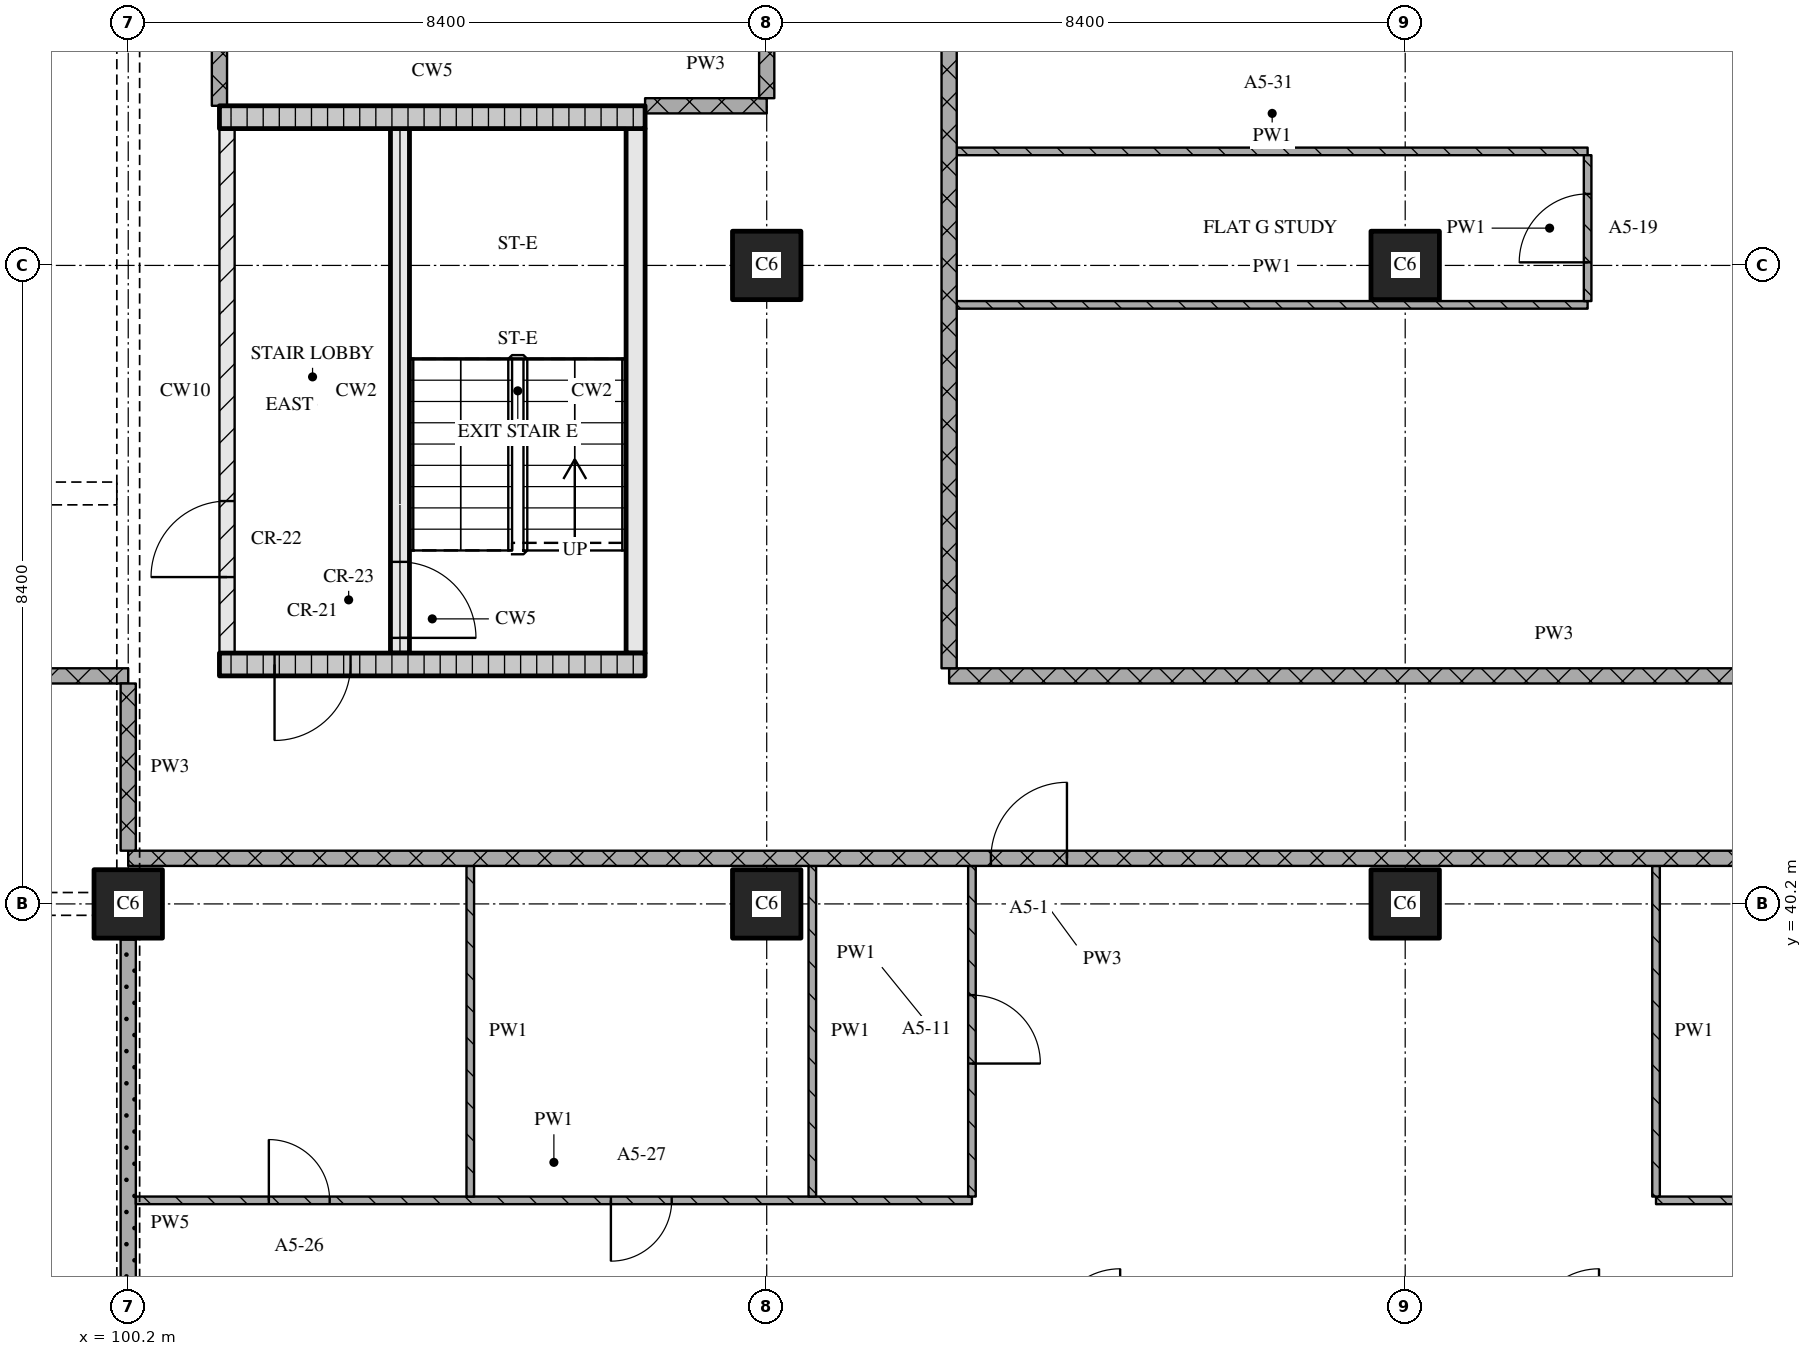
"""IFC4 building model, lengths in metres.
Left out: names, types, materials, properties, quantities, classifications, styles, units other than length and angle.
Written with IfcOpenShell. Run it as: python <this file> out.ifc"""

import sys

from ifc_helpers import new_model, si_unit, direction, frame, frame_2d, origin, origin_2d, place, context, subcontext, project, spatial, rectangle, extrude, element, fill, save


model = new_model("IFC4")
c1 = context("Model", 3, precision=1e-05, world=origin(), true_north=direction((0.0, 1.0)))
c2 = subcontext(c1, "Body", "Model", "MODEL_VIEW")
j1 = project(units=[si_unit("LENGTHUNIT", "METRE"), si_unit("PLANEANGLEUNIT", "RADIAN")], contexts=[c1])
p1 = place(None, origin())
s1 = spatial("IfcSite", under=j1, at=p1, CompositionType="ELEMENT")
p2 = place(p1, origin())
s2 = spatial("IfcBuilding", under=s1, at=p2, CompositionType="ELEMENT")
p3 = place(p2, frame((0.0, 0.0, 80.4)))
s3 = spatial("IfcBuildingStorey", under=s2, at=p3, CompositionType="ELEMENT", Elevation=80.4)
for number, where, z_axis, x_axis in (
    (1, (100.2, 40.2, 0.0), (0.0, 0.0, 1.0), (1.0, 0.0, 0.0)),
    (2, (108.6, 40.2, 0.0), (0.0, 0.0, 1.0), (1.0, 0.0, 0.0)),
    (3, (108.6, 48.6, 0.0), (0.0, 0.0, 1.0), (1.0, 0.0, 0.0)),
    (4, (117.0, 40.2, 0.0), (0.0, 0.0, 1.0), (1.0, 0.0, 0.0)),
    (5, (117.0, 48.6, 0.0), (0.0, 0.0, 1.0), (1.0, 0.0, 0.0)),
):
    element("IfcColumn", number, at=place(p3, frame(where, z_axis=z_axis, x_axis=x_axis)), inside=s3, PredefinedType="COLUMN", context=c2, shape_type="SweptSolid", body=[
        extrude(rectangle(XDim=0.9, YDim=0.9, at=origin_2d()), origin(), (0.0, 0.0, 1.0), 3.6),
    ])
p4 = place(p3, frame((101.4, 43.35, 0.0), z_axis=(0.0, 0.0, 1.0), x_axis=(1.0, 0.0, 0.0)))
e6 = element("IfcWall", 6, at=p4, inside=s3, PredefinedType="SOLIDWALL", context=c2, shape_type="SweptSolid", body=[
    extrude(rectangle(XDim=5.6, YDim=0.3, at=frame_2d((2.8, 0.0))), origin(), (0.0, 0.0, 1.0), 3.3),
])
p5 = place(p4, frame((0.725, 0.0, 0.0)))
e7 = element("IfcOpeningElement", 7, at=p5, cuts=e6, PredefinedType="OPENING", context=c2, shape_type="SweptSolid", body=[
    extrude(rectangle(XDim=1.0, YDim=2.1, at=frame_2d((0.5, 1.05))), frame((0.0, 0.16, 0.0), z_axis=(0.0, -1.0, 0.0), x_axis=(1.0, 0.0, 0.0)), (0.0, 0.0, 1.0), 0.32),
])
p6 = place(p3, frame((101.5, 43.5, 0.0), z_axis=(0.0, 0.0, 1.0), x_axis=(0.0, 1.0, 0.0)))
e8 = element("IfcWall", 8, at=p6, inside=s3, PredefinedType="PARTITIONING", context=c2, shape_type="SweptSolid", body=[
    extrude(rectangle(XDim=6.9, YDim=0.2, at=frame_2d((3.45, 0.0))), origin(), (0.0, 0.0, 1.0), 3.3),
])
p7 = place(p6, frame((1.0, 0.0, 0.0)))
e9 = element("IfcOpeningElement", 9, at=p7, cuts=e8, PredefinedType="OPENING", context=c2, shape_type="SweptSolid", body=[
    extrude(rectangle(XDim=1.0, YDim=2.1, at=frame_2d((0.5, 1.05))), frame((0.0, 0.11, 0.0), z_axis=(0.0, -1.0, 0.0), x_axis=(1.0, 0.0, 0.0)), (0.0, 0.0, 1.0), 0.22),
])
p8 = place(p3, frame((103.775, 43.5, 0.0), z_axis=(0.0, 0.0, 1.0), x_axis=(0.0, 1.0, 0.0)))
e10 = element("IfcWall", 10, at=p8, inside=s3, PredefinedType="SOLIDWALL", context=c2, shape_type="SweptSolid", body=[
    extrude(rectangle(XDim=6.9, YDim=0.25, at=frame_2d((3.45, 0.0))), origin(), (0.0, 0.0, 1.0), 3.3),
])
p9 = place(p8, frame((0.2, 0.0, 0.0)))
e11 = element("IfcOpeningElement", 11, at=p9, cuts=e10, PredefinedType="OPENING", context=c2, shape_type="SweptSolid", body=[
    extrude(rectangle(XDim=1.0, YDim=2.1, at=frame_2d((0.5, 1.05))), frame((0.0, 0.135, 0.0), z_axis=(0.0, -1.0, 0.0), x_axis=(1.0, 0.0, 0.0)), (0.0, 0.0, 1.0), 0.27),
])
p10 = place(p3, frame((106.875, 43.5, 0.0), z_axis=(0.0, 0.0, 1.0), x_axis=(0.0, 1.0, 0.0)))
e12 = element("IfcWall", 12, at=p10, inside=s3, PredefinedType="SOLIDWALL", context=c2, shape_type="SweptSolid", body=[
    extrude(rectangle(XDim=6.9, YDim=0.25, at=frame_2d((3.45, 0.0))), origin(), (0.0, 0.0, 1.0), 3.3),
])
p11 = place(p3, frame((101.4, 50.55, 0.0), z_axis=(0.0, 0.0, 1.0), x_axis=(1.0, 0.0, 0.0)))
e13 = element("IfcWall", 13, at=p11, inside=s3, PredefinedType="SOLIDWALL", context=c2, shape_type="SweptSolid", body=[
    extrude(rectangle(XDim=5.6, YDim=0.3, at=frame_2d((2.8, 0.0))), origin(), (0.0, 0.0, 1.0), 3.3),
])
p12 = place(p3, frame((100.3, 36.3, 0.0), z_axis=(0.0, 0.0, 1.0), x_axis=(1.0, 0.0, 0.0)))
e14 = element("IfcWall", 14, at=p12, inside=s3, PredefinedType="PARTITIONING", context=c2, shape_type="SweptSolid", body=[
    extrude(rectangle(XDim=11.0, YDim=0.1, at=frame_2d((5.5, 0.0))), origin(), (0.0, 0.0, 1.0), 3.3),
])
p13 = place(p12, frame((1.75, 0.0, 0.0)))
e15 = element("IfcOpeningElement", 15, at=p13, cuts=e14, PredefinedType="OPENING", context=c2, shape_type="SweptSolid", body=[
    extrude(rectangle(XDim=0.8, YDim=2.1, at=frame_2d((0.4, 1.05))), frame((0.0, 0.06, 0.0), z_axis=(0.0, -1.0, 0.0), x_axis=(1.0, 0.0, 0.0)), (0.0, 0.0, 1.0), 0.12),
])
p14 = place(p12, frame((6.25, 0.0, 0.0)))
e16 = element("IfcOpeningElement", 16, at=p14, cuts=e14, PredefinedType="OPENING", context=c2, shape_type="SweptSolid", body=[
    extrude(rectangle(XDim=0.8, YDim=2.1, at=frame_2d((0.4, 1.05))), frame((0.0, 0.06, 0.0), z_axis=(0.0, -1.0, 0.0), x_axis=(1.0, 0.0, 0.0)), (0.0, 0.0, 1.0), 0.12),
])
p15 = place(p3, frame((120.3, 36.3, 0.0), z_axis=(0.0, 0.0, 1.0), x_axis=(1.0, 0.0, 0.0)))
e17 = element("IfcWall", 17, at=p15, inside=s3, PredefinedType="PARTITIONING", context=c2, shape_type="SweptSolid", body=[
    extrude(rectangle(XDim=6.62, YDim=0.1, at=frame_2d((3.31, 0.0))), origin(), (0.0, 0.0, 1.0), 3.3),
])
p16 = place(p15, frame((3.0, 0.0, 0.0)))
e18 = element("IfcOpeningElement", 18, at=p16, cuts=e17, PredefinedType="OPENING", context=c2, shape_type="SweptSolid", body=[
    extrude(rectangle(XDim=0.9, YDim=2.1, at=frame_2d((0.45, 1.05))), frame((0.0, 0.06, 0.0), z_axis=(0.0, -1.0, 0.0), x_axis=(1.0, 0.0, 0.0)), (0.0, 0.0, 1.0), 0.12),
])
p17 = place(p3, frame((124.28, 40.8, 0.0), z_axis=(0.0, 0.0, 1.0), x_axis=(-1.0, 0.0, 0.0)))
e19 = element("IfcWall", 19, at=p17, inside=s3, PredefinedType="PARTITIONING", context=c2, shape_type="SweptSolid", body=[
    extrude(rectangle(XDim=24.08, YDim=0.2, at=frame_2d((12.04, 0.0))), origin(), (0.0, 0.0, 1.0), 3.3),
])
p18 = place(p17, frame((11.73, 0.0, 0.0)))
e20 = element("IfcOpeningElement", 20, at=p18, cuts=e19, PredefinedType="OPENING", context=c2, shape_type="SweptSolid", body=[
    extrude(rectangle(XDim=1.0, YDim=2.1, at=frame_2d((0.5, 1.05))), frame((0.0, 0.11, 0.0), z_axis=(0.0, -1.0, 0.0), x_axis=(1.0, 0.0, 0.0)), (0.0, 0.0, 1.0), 0.22),
])
p19 = place(p3, frame((100.2, 43.2, 0.0), z_axis=(0.0, 0.0, 1.0), x_axis=(-1.0, 0.0, 0.0)))
e21 = element("IfcWall", 21, at=p19, inside=s3, PredefinedType="PARTITIONING", context=c2, shape_type="SweptSolid", body=[
    extrude(rectangle(XDim=25.2, YDim=0.2, at=frame_2d((12.6, 0.0))), origin(), (0.0, 0.0, 1.0), 3.3),
])
p20 = place(p19, frame((7.8, 0.0, 0.0)))
e22 = element("IfcOpeningElement", 22, at=p20, cuts=e21, PredefinedType="OPENING", context=c2, shape_type="SweptSolid", body=[
    extrude(rectangle(XDim=1.2, YDim=2.1, at=frame_2d((0.6, 1.05))), frame((0.0, 0.11, 0.0), z_axis=(0.0, -1.0, 0.0), x_axis=(1.0, 0.0, 0.0)), (0.0, 0.0, 1.0), 0.22),
])
p21 = place(p19, frame((20.4, 0.0, 0.0)))
e23 = element("IfcOpeningElement", 23, at=p21, cuts=e21, PredefinedType="OPENING", context=c2, shape_type="SweptSolid", body=[
    extrude(rectangle(XDim=1.2, YDim=2.1, at=frame_2d((0.6, 1.05))), frame((0.0, 0.11, 0.0), z_axis=(0.0, -1.0, 0.0), x_axis=(1.0, 0.0, 0.0)), (0.0, 0.0, 1.0), 0.22),
])
p22 = place(p3, frame((111.0, 43.2, 0.0), z_axis=(0.0, 0.0, 1.0), x_axis=(1.0, 0.0, 0.0)))
e24 = element("IfcWall", 24, at=p22, inside=s3, PredefinedType="PARTITIONING", context=c2, shape_type="SweptSolid", body=[
    extrude(rectangle(XDim=15.92, YDim=0.2, at=frame_2d((7.96, 0.0))), origin(), (0.0, 0.0, 1.0), 3.3),
])
p23 = place(p22, frame((10.95, 0.0, 0.0)))
e25 = element("IfcOpeningElement", 25, at=p23, cuts=e24, PredefinedType="OPENING", context=c2, shape_type="SweptSolid", body=[
    extrude(rectangle(XDim=1.0, YDim=2.1, at=frame_2d((0.5, 1.05))), frame((0.0, 0.11, 0.0), z_axis=(0.0, -1.0, 0.0), x_axis=(1.0, 0.0, 0.0)), (0.0, 0.0, 1.0), 0.22),
])
for number, where, z_axis, x_axis in (
    (26, (111.1, 48.081, 0.0), (0.0, 0.0, 1.0), (1.0, 0.0, 0.0)),
    (27, (111.1, 50.1, 0.0), (0.0, 0.0, 1.0), (1.0, 0.0, 0.0)),
):
    element("IfcWall", number, at=place(p3, frame(where, z_axis=z_axis, x_axis=x_axis)), inside=s3, PredefinedType="PARTITIONING", context=c2, shape_type="SweptSolid", body=[
        extrude(rectangle(XDim=8.3, YDim=0.1, at=frame_2d((4.15, 0.0))), origin(), (0.0, 0.0, 1.0), 3.3),
    ])
p24 = place(p3, frame((107.0, 50.7, 0.0), z_axis=(0.0, 0.0, 1.0), x_axis=(1.0, 0.0, 0.0)))
e28 = element("IfcWall", 28, at=p24, inside=s3, PredefinedType="PARTITIONING", context=c2, shape_type="SweptSolid", body=[
    extrude(rectangle(XDim=1.6, YDim=0.2, at=frame_2d((0.8, 0.0))), origin(), (0.0, 0.0, 1.0), 3.3),
])
p25 = place(p3, frame((100.2, 43.1, 0.0), z_axis=(0.0, 0.0, 1.0), x_axis=(0.0, -1.0, 0.0)))
e29 = element("IfcWall", 29, at=p25, inside=s3, PredefinedType="PARTITIONING", context=c2, shape_type="SweptSolid", body=[
    extrude(rectangle(XDim=2.2, YDim=0.2, at=frame_2d((1.1, 0.0))), origin(), (0.0, 0.0, 1.0), 2.41),
])
p26 = place(p3, frame((100.2, 39.73, 0.0), z_axis=(0.0, 0.0, 1.0), x_axis=(0.0, -1.0, 0.0)))
e30 = element("IfcWall", 30, at=p26, inside=s3, PredefinedType="PARTITIONING", context=c2, shape_type="SweptSolid", body=[
    extrude(rectangle(XDim=7.46, YDim=0.2, at=frame_2d((3.73, 0.0))), origin(), (0.0, 0.0, 1.0), 2.81),
])
p27 = place(p3, frame((101.4, 58.7, 0.0), z_axis=(0.0, 0.0, 1.0), x_axis=(0.0, -1.0, 0.0)))
e31 = element("IfcWall", 31, at=p27, inside=s3, PredefinedType="PARTITIONING", context=c2, shape_type="SweptSolid", body=[
    extrude(rectangle(XDim=8.0, YDim=0.2, at=frame_2d((4.0, 0.0))), origin(), (0.0, 0.0, 1.0), 3.3),
])
p28 = place(p3, frame((104.7, 40.7, 0.0), z_axis=(0.0, 0.0, 1.0), x_axis=(0.0, -1.0, 0.0)))
e32 = element("IfcWall", 32, at=p28, inside=s3, PredefinedType="PARTITIONING", context=c2, shape_type="SweptSolid", body=[
    extrude(rectangle(XDim=4.35, YDim=0.1, at=frame_2d((2.175, 0.0))), origin(), (0.0, 0.0, 1.0), 3.3),
])
p29 = place(p3, frame((108.6, 50.8, 0.0), z_axis=(0.0, 0.0, 1.0), x_axis=(0.0, 1.0, 0.0)))
e33 = element("IfcWall", 33, at=p29, inside=s3, PredefinedType="PARTITIONING", context=c2, shape_type="SweptSolid", body=[
    extrude(rectangle(XDim=5.73, YDim=0.2, at=frame_2d((2.865, 0.0))), origin(), (0.0, 0.0, 1.0), 3.3),
])
p30 = place(p29, frame((2.05, 0.0, 0.0)))
e34 = element("IfcOpeningElement", 34, at=p30, cuts=e33, PredefinedType="OPENING", context=c2, shape_type="SweptSolid", body=[
    extrude(rectangle(XDim=1.2, YDim=2.1, at=frame_2d((0.6, 1.05))), frame((0.0, 0.11, 0.0), z_axis=(0.0, -1.0, 0.0), x_axis=(1.0, 0.0, 0.0)), (0.0, 0.0, 1.0), 0.22),
])
p31 = place(p3, frame((109.2, 40.7, 0.0), z_axis=(0.0, 0.0, 1.0), x_axis=(0.0, -1.0, 0.0)))
e35 = element("IfcWall", 35, at=p31, inside=s3, PredefinedType="PARTITIONING", context=c2, shape_type="SweptSolid", body=[
    extrude(rectangle(XDim=4.35, YDim=0.1, at=frame_2d((2.175, 0.0))), origin(), (0.0, 0.0, 1.0), 3.3),
])
p32 = place(p3, frame((111.0, 75.32, 0.0), z_axis=(0.0, 0.0, 1.0), x_axis=(0.0, -1.0, 0.0)))
e36 = element("IfcWall", 36, at=p32, inside=s3, PredefinedType="PARTITIONING", context=c2, shape_type="SweptSolid", body=[
    extrude(rectangle(XDim=32.02, YDim=0.2, at=frame_2d((16.01, 0.0))), origin(), (0.0, 0.0, 1.0), 3.3),
])
p33 = place(p32, frame((11.37, 0.0, 0.0)))
e37 = element("IfcOpeningElement", 37, at=p33, cuts=e36, PredefinedType="OPENING", context=c2, shape_type="SweptSolid", body=[
    extrude(rectangle(XDim=1.0, YDim=2.1, at=frame_2d((0.5, 1.05))), frame((0.0, 0.11, 0.0), z_axis=(0.0, -1.0, 0.0), x_axis=(1.0, 0.0, 0.0)), (0.0, 0.0, 1.0), 0.22),
])
p34 = place(p3, frame((111.3, 36.35, 0.0), z_axis=(0.0, 0.0, 1.0), x_axis=(0.0, 1.0, 0.0)))
e38 = element("IfcWall", 38, at=p34, inside=s3, PredefinedType="PARTITIONING", context=c2, shape_type="SweptSolid", body=[
    extrude(rectangle(XDim=4.35, YDim=0.1, at=frame_2d((2.175, 0.0))), origin(), (0.0, 0.0, 1.0), 3.3),
])
p35 = place(p34, frame((1.75, 0.0, 0.0)))
e39 = element("IfcOpeningElement", 39, at=p35, cuts=e38, PredefinedType="OPENING", context=c2, shape_type="SweptSolid", body=[
    extrude(rectangle(XDim=0.9, YDim=2.1, at=frame_2d((0.45, 1.05))), frame((0.0, 0.06, 0.0), z_axis=(0.0, -1.0, 0.0), x_axis=(1.0, 0.0, 0.0)), (0.0, 0.0, 1.0), 0.12),
])
p36 = place(p3, frame((119.4, 48.131, 0.0), z_axis=(0.0, 0.0, 1.0), x_axis=(0.0, 1.0, 0.0)))
e40 = element("IfcWall", 40, at=p36, inside=s3, PredefinedType="PARTITIONING", context=c2, shape_type="SweptSolid", body=[
    extrude(rectangle(XDim=1.919, YDim=0.1, at=frame_2d((0.959, 0.0))), origin(), (0.0, 0.0, 1.0), 3.3),
])
p37 = place(p36, frame((0.51, 0.0, 0.0)))
e41 = element("IfcOpeningElement", 41, at=p37, cuts=e40, PredefinedType="OPENING", context=c2, shape_type="SweptSolid", body=[
    extrude(rectangle(XDim=0.9, YDim=2.1, at=frame_2d((0.45, 1.05))), frame((0.0, 0.06, 0.0), z_axis=(0.0, -1.0, 0.0), x_axis=(1.0, 0.0, 0.0)), (0.0, 0.0, 1.0), 0.12),
])
p38 = place(p3, frame((120.3, 40.7, 0.0), z_axis=(0.0, 0.0, 1.0), x_axis=(0.0, -1.0, 0.0)))
e42 = element("IfcWall", 42, at=p38, inside=s3, PredefinedType="PARTITIONING", context=c2, shape_type="SweptSolid", body=[
    extrude(rectangle(XDim=4.35, YDim=0.1, at=frame_2d((2.175, 0.0))), origin(), (0.0, 0.0, 1.0), 3.3),
])
p39 = place(p5, origin())
e43 = element("IfcDoor", 43, at=p39, inside=s3, OperationType="SINGLE_SWING_RIGHT", PredefinedType="DOOR", context=c2, shape_type="SweptSolid", body=[
    extrude(rectangle(XDim=1.0, YDim=2.1, at=frame_2d((0.5, 1.05))), frame((0.0, 0.025, 0.0), z_axis=(0.0, -1.0, 0.0), x_axis=(1.0, 0.0, 0.0)), (0.0, 0.0, 1.0), 0.05),
])
fill(e7, e43)
p40 = place(p9, origin())
e44 = element("IfcDoor", 44, at=p40, inside=s3, OperationType="SINGLE_SWING_RIGHT", PredefinedType="DOOR", context=c2, shape_type="SweptSolid", body=[
    extrude(rectangle(XDim=1.0, YDim=2.1, at=frame_2d((0.5, 1.05))), frame((0.0, 0.025, 0.0), z_axis=(0.0, -1.0, 0.0), x_axis=(1.0, 0.0, 0.0)), (0.0, 0.0, 1.0), 0.05),
])
fill(e11, e44)
p41 = place(p7, origin())
e45 = element("IfcDoor", 45, at=p41, inside=s3, OperationType="SINGLE_SWING_LEFT", PredefinedType="DOOR", context=c2, shape_type="SweptSolid", body=[
    extrude(rectangle(XDim=1.0, YDim=2.1, at=frame_2d((0.5, 1.05))), frame((0.0, 0.025, 0.0), z_axis=(0.0, -1.0, 0.0), x_axis=(1.0, 0.0, 0.0)), (0.0, 0.0, 1.0), 0.05),
])
fill(e9, e45)
p42 = place(p13, origin())
e46 = element("IfcDoor", 46, at=p42, inside=s3, OperationType="SINGLE_SWING_LEFT", PredefinedType="DOOR", context=c2, shape_type="SweptSolid", body=[
    extrude(rectangle(XDim=0.8, YDim=2.1, at=frame_2d((0.4, 1.05))), frame((0.0, 0.025, 0.0), z_axis=(0.0, -1.0, 0.0), x_axis=(1.0, 0.0, 0.0)), (0.0, 0.0, 1.0), 0.05),
])
fill(e15, e46)
p43 = place(p14, origin())
e47 = element("IfcDoor", 47, at=p43, inside=s3, OperationType="SINGLE_SWING_RIGHT", PredefinedType="DOOR", context=c2, shape_type="SweptSolid", body=[
    extrude(rectangle(XDim=0.8, YDim=2.1, at=frame_2d((0.4, 1.05))), frame((0.0, 0.025, 0.0), z_axis=(0.0, -1.0, 0.0), x_axis=(1.0, 0.0, 0.0)), (0.0, 0.0, 1.0), 0.05),
])
fill(e16, e47)
p44 = place(p18, origin())
e48 = element("IfcDoor", 48, at=p44, inside=s3, OperationType="SINGLE_SWING_RIGHT", PredefinedType="DOOR", context=c2, shape_type="SweptSolid", body=[
    extrude(rectangle(XDim=1.0, YDim=2.1, at=frame_2d((0.5, 1.05))), frame((0.0, 0.025, 0.0), z_axis=(0.0, -1.0, 0.0), x_axis=(1.0, 0.0, 0.0)), (0.0, 0.0, 1.0), 0.05),
])
fill(e20, e48)
p45 = place(p35, origin())
e49 = element("IfcDoor", 49, at=p45, inside=s3, OperationType="SINGLE_SWING_RIGHT", PredefinedType="DOOR", context=c2, shape_type="SweptSolid", body=[
    extrude(rectangle(XDim=0.9, YDim=2.1, at=frame_2d((0.45, 1.05))), frame((0.0, 0.025, 0.0), z_axis=(0.0, -1.0, 0.0), x_axis=(1.0, 0.0, 0.0)), (0.0, 0.0, 1.0), 0.05),
])
fill(e39, e49)
p46 = place(p37, origin())
e50 = element("IfcDoor", 50, at=p46, inside=s3, OperationType="SINGLE_SWING_LEFT", PredefinedType="DOOR", context=c2, shape_type="SweptSolid", body=[
    extrude(rectangle(XDim=0.9, YDim=2.1, at=frame_2d((0.45, 1.05))), frame((0.0, 0.025, 0.0), z_axis=(0.0, -1.0, 0.0), x_axis=(1.0, 0.0, 0.0)), (0.0, 0.0, 1.0), 0.05),
])
fill(e41, e50)
save(model, sys.argv[1])
